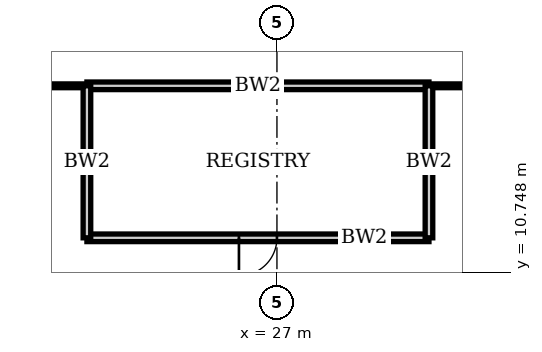
"""IFC4 building model, lengths in metres.
Left out: names, types, materials, properties, quantities, classifications, styles, units other than length and angle.
Written with IfcOpenShell. Run it as: python <this file> out.ifc"""

import sys

from ifc_helpers import new_model, si_unit, direction, frame, frame_2d, origin, place, context, subcontext, project, spatial, rectangle, extrude, element, fill, save


model = new_model("IFC4")
c1 = context("Model", 3, precision=1e-05, world=origin(), true_north=direction((0.0, 1.0)))
c2 = subcontext(c1, "Body", "Model", "MODEL_VIEW")
j1 = project(units=[si_unit("LENGTHUNIT", "METRE"), si_unit("PLANEANGLEUNIT", "RADIAN")], contexts=[c1])
p1 = place(None, origin())
s1 = spatial("IfcSite", under=j1, at=p1, CompositionType="ELEMENT")
p2 = place(p1, origin())
s2 = spatial("IfcBuilding", under=s1, at=p2, CompositionType="ELEMENT")
p3 = place(p2, frame((0.0, 0.0, 19.8)))
s3 = spatial("IfcBuildingStorey", under=s2, at=p3, CompositionType="ELEMENT", Elevation=19.8)
p4 = place(p3, frame((22.0, 11.65, 0.0), z_axis=(0.0, 0.0, 1.0), x_axis=(1.0, 0.0, 0.0)))
e1 = element("IfcWall", 1, at=p4, inside=s3, PredefinedType="SOLIDWALL", context=c2, shape_type="SweptSolid", body=[
    extrude(rectangle(XDim=9.0, YDim=0.2, at=frame_2d((4.5, 0.0))), origin(), (0.0, 0.0, 1.0), 3.75),
])
p5 = place(p4, frame((4.0, 0.0, 0.0)))
e2 = element("IfcOpeningElement", 2, at=p5, cuts=e1, PredefinedType="OPENING", context=c2, shape_type="SweptSolid", body=[
    extrude(rectangle(XDim=1.0, YDim=2.4, at=frame_2d((0.5, 1.2))), frame((0.0, 0.11, 0.0), z_axis=(0.0, -1.0, 0.0), x_axis=(1.0, 0.0, 0.0)), (0.0, 0.0, 1.0), 0.22),
])
p6 = place(p3, frame((22.0, 15.65, 0.0), z_axis=(0.0, 0.0, 1.0), x_axis=(1.0, 0.0, 0.0)))
e3 = element("IfcWall", 3, at=p6, inside=s3, PredefinedType="SOLIDWALL", context=c2, shape_type="SweptSolid", body=[
    extrude(rectangle(XDim=9.0, YDim=0.2, at=frame_2d((4.5, 0.0))), origin(), (0.0, 0.0, 1.0), 3.75),
])
p7 = place(p3, frame((18.0, 15.65, 0.0), z_axis=(0.0, 0.0, 1.0), x_axis=(1.0, 0.0, 0.0)))
e4 = element("IfcWall", 4, at=p7, inside=s3, PredefinedType="PARTITIONING", context=c2, shape_type="SweptSolid", body=[
    extrude(rectangle(XDim=4.0, YDim=0.1, at=frame_2d((2.0, 0.0))), origin(), (0.0, 0.0, 1.0), 3.75),
])
p8 = place(p7, frame((1.5, 0.0, 0.0)))
e5 = element("IfcOpeningElement", 5, at=p8, cuts=e4, PredefinedType="OPENING", context=c2, shape_type="SweptSolid", body=[
    extrude(rectangle(XDim=1.0, YDim=2.4, at=frame_2d((0.5, 1.2))), frame((0.0, 0.06, 0.0), z_axis=(0.0, -1.0, 0.0), x_axis=(1.0, 0.0, 0.0)), (0.0, 0.0, 1.0), 0.12),
])
p9 = place(p3, frame((31.0, 15.65, 0.0), z_axis=(0.0, 0.0, 1.0), x_axis=(1.0, 0.0, 0.0)))
e6 = element("IfcWall", 6, at=p9, inside=s3, PredefinedType="PARTITIONING", context=c2, shape_type="SweptSolid", body=[
    extrude(rectangle(XDim=9.5, YDim=0.1, at=frame_2d((4.75, 0.0))), origin(), (0.0, 0.0, 1.0), 3.75),
])
for number, where, z_axis, x_axis in (
    (7, (22.0, 11.65, 0.0), (0.0, 0.0, 1.0), (0.0, 1.0, 0.0)),
    (8, (31.0, 11.65, 0.0), (0.0, 0.0, 1.0), (0.0, 1.0, 0.0)),
):
    element("IfcWall", number, at=place(p3, frame(where, z_axis=z_axis, x_axis=x_axis)), inside=s3, PredefinedType="SOLIDWALL", context=c2, shape_type="SweptSolid", body=[
        extrude(rectangle(XDim=4.0, YDim=0.2, at=frame_2d((2.0, 0.0))), origin(), (0.0, 0.0, 1.0), 3.75),
    ])
p10 = place(p5, origin())
e9 = element("IfcDoor", 9, at=p10, inside=s3, OperationType="SINGLE_SWING_LEFT", PredefinedType="DOOR", context=c2, shape_type="SweptSolid", body=[
    extrude(rectangle(XDim=1.0, YDim=2.4, at=frame_2d((0.5, 1.2))), frame((0.0, 0.035, 0.0), z_axis=(0.0, -1.0, 0.0), x_axis=(1.0, 0.0, 0.0)), (0.0, 0.0, 1.0), 0.07),
])
fill(e2, e9)
save(model, sys.argv[1])
